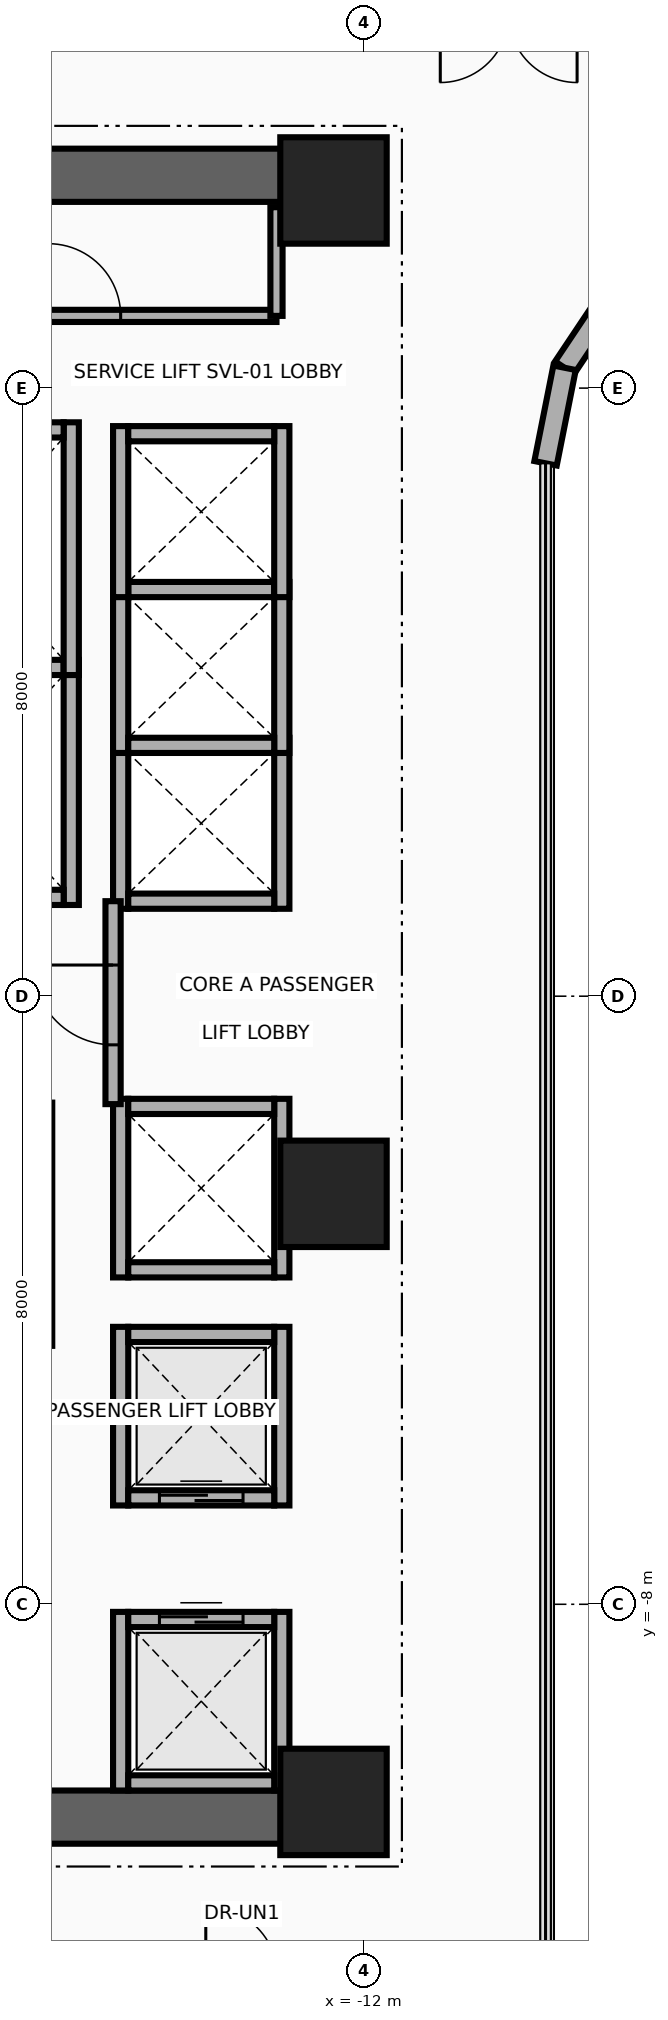
"""IFC4 building model, lengths in metres.
Left out: names, types, materials, properties, quantities, classifications, styles, units other than length and angle.
Written with IfcOpenShell. Run it as: python <this file> out.ifc"""

import sys

from ifc_helpers import new_model, si_unit, direction, frame, frame_2d, origin, origin_2d, place, context, subcontext, project, spatial, rectangle, extrude, source, transform, mapped, element, fill, save


model = new_model("IFC4")
c1 = context("Model", 3, precision=1e-05, world=origin(), true_north=direction((0.0, 1.0)))
c2 = subcontext(c1, "Body", "Model", "MODEL_VIEW")
j1 = project(units=[si_unit("LENGTHUNIT", "METRE"), si_unit("PLANEANGLEUNIT", "RADIAN")], contexts=[c1])
p1 = place(None, origin())
s1 = spatial("IfcSite", under=j1, at=p1, CompositionType="ELEMENT")
p2 = place(p1, origin())
s2 = spatial("IfcBuilding", under=s1, at=p2, CompositionType="ELEMENT")
p3 = place(p2, frame((0.0, 0.0, 66.7)))
s3 = spatial("IfcBuildingStorey", under=s2, at=p3, CompositionType="ELEMENT", Elevation=66.7)
for number, where, z_axis, x_axis in (
    (1, (-22.65, 10.8, 0.0), (0.0, 0.0, 1.0), (1.0, 0.0, 0.0)),
    (2, (-22.65, -10.8, 0.0), (0.0, 0.0, 1.0), (1.0, 0.0, 0.0)),
):
    element("IfcWall", number, at=place(p3, frame(where, z_axis=z_axis, x_axis=x_axis)), inside=s3, PredefinedType="SHEAR", context=c2, shape_type="SweptSolid", body=[
        extrude(rectangle(XDim=10.25, YDim=0.7, at=frame_2d((5.125, 0.0))), origin(), (0.0, 0.0, 1.0), 3.46),
    ])
m1 = source(origin(), c2, "Body", "SweptSolid", [
    extrude(rectangle(XDim=1.4, YDim=1.4, at=origin_2d()), origin(), (0.0, 0.0, 1.0), 3.7),
])
for number, where, z_axis, x_axis in (
    (3, (-12.4, -10.6, 0.0), (0.0, 0.0, 1.0), (1.0, 0.0, 0.0)),
    (4, (-12.4, -2.6, 0.0), (0.0, 0.0, 1.0), (1.0, 0.0, 0.0)),
    (5, (-12.4, 10.6, 0.0), (0.0, 0.0, 1.0), (1.0, 0.0, 0.0)),
):
    element("IfcColumn", number, at=place(p3, frame(where, z_axis=z_axis, x_axis=x_axis)), inside=s3, PredefinedType="COLUMN", context=c2, shape_type="MappedRepresentation", body=[
        mapped(m1, transform((0.0, 0.0, 0.0), x_axis=(1.0, 0.0, 0.0), y_axis=(0.0, 1.0, 0.0), z_axis=(0.0, 0.0, 1.0), scale=1.0)),
    ])
p4 = place(p3, frame((-8.642, 9.342, 0.0), z_axis=(0.0, 0.0, 1.0), x_axis=(-0.555615398575, -0.831439431869, 0.0)))
e6 = element("IfcWall", 6, at=p4, inside=s3, PredefinedType="SOLIDWALL", context=c2, shape_type="SweptSolid", body=[
    extrude(rectangle(XDim=1.292, YDim=0.3, at=frame_2d((0.646, 0.0))), origin(), (0.0, 0.0, 1.0), 3.46),
])
p5 = place(p3, frame((-9.36, 8.268, 0.0), z_axis=(0.0, 0.0, 1.0), x_axis=(-0.195090163074, -0.980785312019, 0.0)))
e7 = element("IfcWall", 7, at=p5, inside=s3, PredefinedType="SOLIDWALL", context=c2, shape_type="SweptSolid", body=[
    extrude(rectangle(XDim=1.281, YDim=0.3, at=frame_2d((0.641, 0.0))), origin(), (0.0, 0.0, 1.0), 3.46),
])
p6 = place(p3, frame((-15.85, 1.2, 0.0), z_axis=(0.0, 0.0, 1.0), x_axis=(0.0, 1.0, 0.0)))
e8 = element("IfcWall", 8, at=p6, inside=s3, PredefinedType="MOVABLE", context=c2, shape_type="SweptSolid", body=[
    extrude(rectangle(XDim=3.225, YDim=0.2, at=frame_2d((1.613, 0.0))), origin(), (0.0, 0.0, 1.0), 3.46),
])
p7 = place(p3, frame((-18.55, 1.3, 0.0), z_axis=(0.0, 0.0, 1.0), x_axis=(1.0, 0.0, 0.0)))
e9 = element("IfcWall", 9, at=p7, inside=s3, PredefinedType="MOVABLE", context=c2, shape_type="SweptSolid", body=[
    extrude(rectangle(XDim=2.6, YDim=0.2, at=frame_2d((1.3, 0.0))), origin(), (0.0, 0.0, 1.0), 3.46),
])
p8 = place(p7, frame((0.7, 0.0, 0.0)))
e10 = element("IfcOpeningElement", 10, at=p8, cuts=e9, PredefinedType="OPENING", context=c2, shape_type="SweptSolid", body=[
    extrude(rectangle(XDim=1.2, YDim=2.1, at=frame_2d((0.6, 1.05))), frame((0.0, 0.115, 0.0), z_axis=(0.0, -1.0, 0.0), x_axis=(1.0, 0.0, 0.0)), (0.0, 0.0, 1.0), 0.23),
])
p9 = place(p3, frame((-18.55, 4.325, 0.0), z_axis=(0.0, 0.0, 1.0), x_axis=(1.0, 0.0, 0.0)))
e11 = element("IfcWall", 11, at=p9, inside=s3, PredefinedType="MOVABLE", context=c2, shape_type="SweptSolid", body=[
    extrude(rectangle(XDim=2.6, YDim=0.2, at=frame_2d((1.3, 0.0))), origin(), (0.0, 0.0, 1.0), 3.46),
])
p10 = place(p3, frame((-16.2, -4.6, 0.0), z_axis=(0.0, 0.0, 1.0), x_axis=(0.0, 1.0, 0.0)))
e12 = element("IfcWall", 12, at=p10, inside=s3, PredefinedType="MOVABLE", context=c2, shape_type="SweptSolid", body=[
    extrude(rectangle(XDim=3.2, YDim=0.2, at=frame_2d((1.6, 0.0))), origin(), (0.0, 0.0, 1.0), 3.46),
])
p11 = place(p3, frame((-15.85, 4.225, 0.0), z_axis=(0.0, 0.0, 1.0), x_axis=(0.0, 1.0, 0.0)))
e13 = element("IfcWall", 13, at=p11, inside=s3, PredefinedType="MOVABLE", context=c2, shape_type="SweptSolid", body=[
    extrude(rectangle(XDim=3.325, YDim=0.2, at=frame_2d((1.663, 0.0))), origin(), (0.0, 0.0, 1.0), 3.46),
])
p12 = place(p3, frame((-18.55, 7.45, 0.0), z_axis=(0.0, 0.0, 1.0), x_axis=(1.0, 0.0, 0.0)))
e14 = element("IfcWall", 14, at=p12, inside=s3, PredefinedType="MOVABLE", context=c2, shape_type="SweptSolid", body=[
    extrude(rectangle(XDim=2.6, YDim=0.2, at=frame_2d((1.3, 0.0))), origin(), (0.0, 0.0, 1.0), 3.46),
])
p13 = place(p12, frame((0.7, 0.0, 0.0)))
e15 = element("IfcOpeningElement", 15, at=p13, cuts=e14, PredefinedType="OPENING", context=c2, shape_type="SweptSolid", body=[
    extrude(rectangle(XDim=1.2, YDim=2.1, at=frame_2d((0.6, 1.05))), frame((0.0, 0.115, 0.0), z_axis=(0.0, -1.0, 0.0), x_axis=(1.0, 0.0, 0.0)), (0.0, 0.0, 1.0), 0.23),
])
for number, where, z_axis, x_axis in (
    (16, (-15.2, -10.45, 0.0), (0.0, 0.0, 1.0), (0.0, 1.0, 0.0)),
    (17, (-13.08, -10.45, 0.0), (0.0, 0.0, 1.0), (0.0, 1.0, 0.0)),
):
    element("IfcWall", number, at=place(p3, frame(where, z_axis=z_axis, x_axis=x_axis)), inside=s3, PredefinedType="MOVABLE", context=c2, shape_type="SweptSolid", body=[
        extrude(rectangle(XDim=2.35, YDim=0.2, at=frame_2d((1.175, 0.0))), origin(), (0.0, 0.0, 1.0), 2.583),
    ])
p14 = place(p3, frame((-15.1, -10.35, 0.0), z_axis=(0.0, 0.0, 1.0), x_axis=(1.0, 0.0, 0.0)))
e18 = element("IfcWall", 18, at=p14, inside=s3, PredefinedType="MOVABLE", context=c2, shape_type="SweptSolid", body=[
    extrude(rectangle(XDim=1.92, YDim=0.2, at=frame_2d((0.96, 0.0))), origin(), (0.0, 0.0, 1.0), 2.583),
])
p15 = place(p3, frame((-15.1, -8.2, 0.0), z_axis=(0.0, 0.0, 1.0), x_axis=(1.0, 0.0, 0.0)))
e19 = element("IfcWall", 19, at=p15, inside=s3, PredefinedType="MOVABLE", context=c2, shape_type="SweptSolid", body=[
    extrude(rectangle(XDim=1.92, YDim=0.2, at=frame_2d((0.96, 0.0))), origin(), (0.0, 0.0, 1.0), 3.46),
])
p16 = place(p15, frame((0.41, 0.0, 0.0)))
e20 = element("IfcOpeningElement", 20, at=p16, cuts=e19, PredefinedType="OPENING", context=c2, shape_type="SweptSolid", body=[
    extrude(rectangle(XDim=1.1, YDim=2.1, at=frame_2d((0.55, 1.05))), frame((0.0, 0.115, 0.0), z_axis=(0.0, -1.0, 0.0), x_axis=(1.0, 0.0, 0.0)), (0.0, 0.0, 1.0), 0.23),
])
for number, where, z_axis, x_axis in (
    (21, (-15.2, -6.7, 0.0), (0.0, 0.0, 1.0), (0.0, 1.0, 0.0)),
    (22, (-13.08, -6.7, 0.0), (0.0, 0.0, 1.0), (0.0, 1.0, 0.0)),
):
    element("IfcWall", number, at=place(p3, frame(where, z_axis=z_axis, x_axis=x_axis)), inside=s3, PredefinedType="MOVABLE", context=c2, shape_type="SweptSolid", body=[
        extrude(rectangle(XDim=2.35, YDim=0.2, at=frame_2d((1.175, 0.0))), origin(), (0.0, 0.0, 1.0), 3.46),
    ])
p17 = place(p3, frame((-15.1, -6.6, 0.0), z_axis=(0.0, 0.0, 1.0), x_axis=(1.0, 0.0, 0.0)))
e23 = element("IfcWall", 23, at=p17, inside=s3, PredefinedType="MOVABLE", context=c2, shape_type="SweptSolid", body=[
    extrude(rectangle(XDim=1.92, YDim=0.2, at=frame_2d((0.96, 0.0))), origin(), (0.0, 0.0, 1.0), 3.46),
])
p18 = place(p17, frame((0.41, 0.0, 0.0)))
e24 = element("IfcOpeningElement", 24, at=p18, cuts=e23, PredefinedType="OPENING", context=c2, shape_type="SweptSolid", body=[
    extrude(rectangle(XDim=1.1, YDim=2.1, at=frame_2d((0.55, 1.05))), frame((0.0, 0.115, 0.0), z_axis=(0.0, -1.0, 0.0), x_axis=(1.0, 0.0, 0.0)), (0.0, 0.0, 1.0), 0.23),
])
p19 = place(p3, frame((-15.1, -4.45, 0.0), z_axis=(0.0, 0.0, 1.0), x_axis=(1.0, 0.0, 0.0)))
e25 = element("IfcWall", 25, at=p19, inside=s3, PredefinedType="MOVABLE", context=c2, shape_type="SweptSolid", body=[
    extrude(rectangle(XDim=1.92, YDim=0.2, at=frame_2d((0.96, 0.0))), origin(), (0.0, 0.0, 1.0), 3.46),
])
for number, where, z_axis, x_axis in (
    (26, (-15.2, 1.15, 0.0), (0.0, 0.0, 1.0), (0.0, 1.0, 0.0)),
    (27, (-13.08, 1.15, 0.0), (0.0, 0.0, 1.0), (0.0, 1.0, 0.0)),
):
    element("IfcWall", number, at=place(p3, frame(where, z_axis=z_axis, x_axis=x_axis)), inside=s3, PredefinedType="MOVABLE", context=c2, shape_type="SweptSolid", body=[
        extrude(rectangle(XDim=2.25, YDim=0.2, at=frame_2d((1.125, 0.0))), origin(), (0.0, 0.0, 1.0), 3.46),
    ])
p20 = place(p3, frame((-15.1, 1.25, 0.0), z_axis=(0.0, 0.0, 1.0), x_axis=(1.0, 0.0, 0.0)))
e28 = element("IfcWall", 28, at=p20, inside=s3, PredefinedType="MOVABLE", context=c2, shape_type="SweptSolid", body=[
    extrude(rectangle(XDim=1.92, YDim=0.2, at=frame_2d((0.96, 0.0))), origin(), (0.0, 0.0, 1.0), 3.46),
])
for number, where, z_axis, x_axis in (
    (29, (-15.2, 3.2, 0.0), (0.0, 0.0, 1.0), (0.0, 1.0, 0.0)),
    (30, (-13.08, 3.2, 0.0), (0.0, 0.0, 1.0), (0.0, 1.0, 0.0)),
):
    element("IfcWall", number, at=place(p3, frame(where, z_axis=z_axis, x_axis=x_axis)), inside=s3, PredefinedType="MOVABLE", context=c2, shape_type="SweptSolid", body=[
        extrude(rectangle(XDim=2.25, YDim=0.2, at=frame_2d((1.125, 0.0))), origin(), (0.0, 0.0, 1.0), 3.46),
    ])
for number, where, z_axis, x_axis in (
    (31, (-15.1, 3.3, 0.0), (0.0, 0.0, 1.0), (1.0, 0.0, 0.0)),
    (32, (-15.1, 5.35, 0.0), (0.0, 0.0, 1.0), (1.0, 0.0, 0.0)),
):
    element("IfcWall", number, at=place(p3, frame(where, z_axis=z_axis, x_axis=x_axis)), inside=s3, PredefinedType="MOVABLE", context=c2, shape_type="SweptSolid", body=[
        extrude(rectangle(XDim=1.92, YDim=0.2, at=frame_2d((0.96, 0.0))), origin(), (0.0, 0.0, 1.0), 3.46),
    ])
for number, where, z_axis, x_axis in (
    (33, (-15.2, 5.25, 0.0), (0.0, 0.0, 1.0), (0.0, 1.0, 0.0)),
    (34, (-13.08, 5.25, 0.0), (0.0, 0.0, 1.0), (0.0, 1.0, 0.0)),
):
    element("IfcWall", number, at=place(p3, frame(where, z_axis=z_axis, x_axis=x_axis)), inside=s3, PredefinedType="MOVABLE", context=c2, shape_type="SweptSolid", body=[
        extrude(rectangle(XDim=2.25, YDim=0.2, at=frame_2d((1.125, 0.0))), origin(), (0.0, 0.0, 1.0), 3.46),
    ])
p21 = place(p3, frame((-15.1, 7.4, 0.0), z_axis=(0.0, 0.0, 1.0), x_axis=(1.0, 0.0, 0.0)))
e35 = element("IfcWall", 35, at=p21, inside=s3, PredefinedType="MOVABLE", context=c2, shape_type="SweptSolid", body=[
    extrude(rectangle(XDim=1.92, YDim=0.2, at=frame_2d((0.96, 0.0))), origin(), (0.0, 0.0, 1.0), 3.46),
])
for number, where, z_axis, x_axis in (
    (36, (-15.2, -3.7, 0.0), (0.0, 0.0, 1.0), (0.0, 1.0, 0.0)),
    (37, (-13.08, -3.7, 0.0), (0.0, 0.0, 1.0), (0.0, 1.0, 0.0)),
):
    element("IfcWall", number, at=place(p3, frame(where, z_axis=z_axis, x_axis=x_axis)), inside=s3, PredefinedType="MOVABLE", context=c2, shape_type="SweptSolid", body=[
        extrude(rectangle(XDim=2.35, YDim=0.2, at=frame_2d((1.175, 0.0))), origin(), (0.0, 0.0, 1.0), 3.46),
    ])
for number, where, z_axis, x_axis in (
    (38, (-15.1, -3.6, 0.0), (0.0, 0.0, 1.0), (1.0, 0.0, 0.0)),
    (39, (-15.1, -1.45, 0.0), (0.0, 0.0, 1.0), (1.0, 0.0, 0.0)),
):
    element("IfcWall", number, at=place(p3, frame(where, z_axis=z_axis, x_axis=x_axis)), inside=s3, PredefinedType="MOVABLE", context=c2, shape_type="SweptSolid", body=[
        extrude(rectangle(XDim=1.92, YDim=0.2, at=frame_2d((0.96, 0.0))), origin(), (0.0, 0.0, 1.0), 3.46),
    ])
p22 = place(p3, frame((-15.3, -1.42, 0.0), z_axis=(0.0, 0.0, 1.0), x_axis=(0.0, 1.0, 0.0)))
e40 = element("IfcWall", 40, at=p22, inside=s3, PredefinedType="PARTITIONING", context=c2, shape_type="SweptSolid", body=[
    extrude(rectangle(XDim=2.67, YDim=0.2, at=frame_2d((1.335, 0.0))), origin(), (0.0, 0.0, 1.0), 3.46),
])
p23 = place(p22, frame((0.78, 0.0, 0.0)))
e41 = element("IfcOpeningElement", 41, at=p23, cuts=e40, PredefinedType="OPENING", context=c2, shape_type="SweptSolid", body=[
    extrude(rectangle(XDim=1.05, YDim=2.15, at=frame_2d((0.525, 1.075))), frame((0.0, 0.115, 0.0), z_axis=(0.0, -1.0, 0.0), x_axis=(1.0, 0.0, 0.0)), (0.0, 0.0, 1.0), 0.23),
])
p24 = place(p3, frame((-18.65, 8.95, 0.0), z_axis=(0.0, 0.0, 1.0), x_axis=(1.0, 0.0, 0.0)))
e42 = element("IfcWall", 42, at=p24, inside=s3, PredefinedType="PARTITIONING", context=c2, shape_type="SweptSolid", body=[
    extrude(rectangle(XDim=5.5, YDim=0.16, at=frame_2d((2.75, 0.0))), origin(), (0.0, 0.0, 1.0), 3.46),
])
p25 = place(p24, frame((0.3, 0.0, 0.0)))
e43 = element("IfcOpeningElement", 43, at=p25, cuts=e42, PredefinedType="OPENING", context=c2, shape_type="SweptSolid", body=[
    extrude(rectangle(XDim=0.85, YDim=2.05, at=frame_2d((0.425, 1.025))), frame((0.0, 0.095, 0.0), z_axis=(0.0, -1.0, 0.0), x_axis=(1.0, 0.0, 0.0)), (0.0, 0.0, 1.0), 0.19),
])
p26 = place(p24, frame((2.5, 0.0, 0.0)))
e44 = element("IfcOpeningElement", 44, at=p26, cuts=e42, PredefinedType="OPENING", context=c2, shape_type="SweptSolid", body=[
    extrude(rectangle(XDim=0.95, YDim=2.15, at=frame_2d((0.475, 1.075))), frame((0.0, 0.095, 0.0), z_axis=(0.0, -1.0, 0.0), x_axis=(1.0, 0.0, 0.0)), (0.0, 0.0, 1.0), 0.19),
])
p27 = place(p3, frame((-13.15, 8.95, 0.0), z_axis=(0.0, 0.0, 1.0), x_axis=(0.0, 1.0, 0.0)))
e45 = element("IfcWall", 45, at=p27, inside=s3, PredefinedType="PARTITIONING", context=c2, shape_type="SweptSolid", body=[
    extrude(rectangle(XDim=1.43, YDim=0.16, at=frame_2d((0.715, 0.0))), origin(), (0.0, 0.0, 1.0), 3.46),
])
p28 = place(p16, origin())
e46 = element("IfcDoor", 46, at=p28, inside=s3, OperationType="DOUBLE_DOOR_SLIDING", PredefinedType="DOOR", context=c2, shape_type="SweptSolid", body=[
    extrude(rectangle(XDim=1.1, YDim=2.1, at=frame_2d((0.55, 1.05))), frame((0.0, 0.025, 0.0), z_axis=(0.0, -1.0, 0.0), x_axis=(1.0, 0.0, 0.0)), (0.0, 0.0, 1.0), 0.05),
])
fill(e20, e46)
p29 = place(p18, origin())
e47 = element("IfcDoor", 47, at=p29, inside=s3, OperationType="DOUBLE_DOOR_SLIDING", PredefinedType="DOOR", context=c2, shape_type="SweptSolid", body=[
    extrude(rectangle(XDim=1.1, YDim=2.1, at=frame_2d((0.55, 1.05))), frame((0.0, 0.025, 0.0), z_axis=(0.0, -1.0, 0.0), x_axis=(1.0, 0.0, 0.0)), (0.0, 0.0, 1.0), 0.05),
])
fill(e24, e47)
p30 = place(p23, origin())
e48 = element("IfcDoor", 48, at=p30, inside=s3, OperationType="SINGLE_SWING_RIGHT", PredefinedType="DOOR", context=c2, shape_type="SweptSolid", body=[
    extrude(rectangle(XDim=1.05, YDim=2.15, at=frame_2d((0.525, 1.075))), frame((0.0, 0.025, 0.0), z_axis=(0.0, -1.0, 0.0), x_axis=(1.0, 0.0, 0.0)), (0.0, 0.0, 1.0), 0.05),
])
fill(e41, e48)
p31 = place(p26, origin())
e49 = element("IfcDoor", 49, at=p31, inside=s3, OperationType="SINGLE_SWING_RIGHT", PredefinedType="DOOR", context=c2, shape_type="SweptSolid", body=[
    extrude(rectangle(XDim=0.95, YDim=2.15, at=frame_2d((0.475, 1.075))), frame((0.0, 0.025, 0.0), z_axis=(0.0, -1.0, 0.0), x_axis=(1.0, 0.0, 0.0)), (0.0, 0.0, 1.0), 0.05),
])
fill(e44, e49)
save(model, sys.argv[1])
